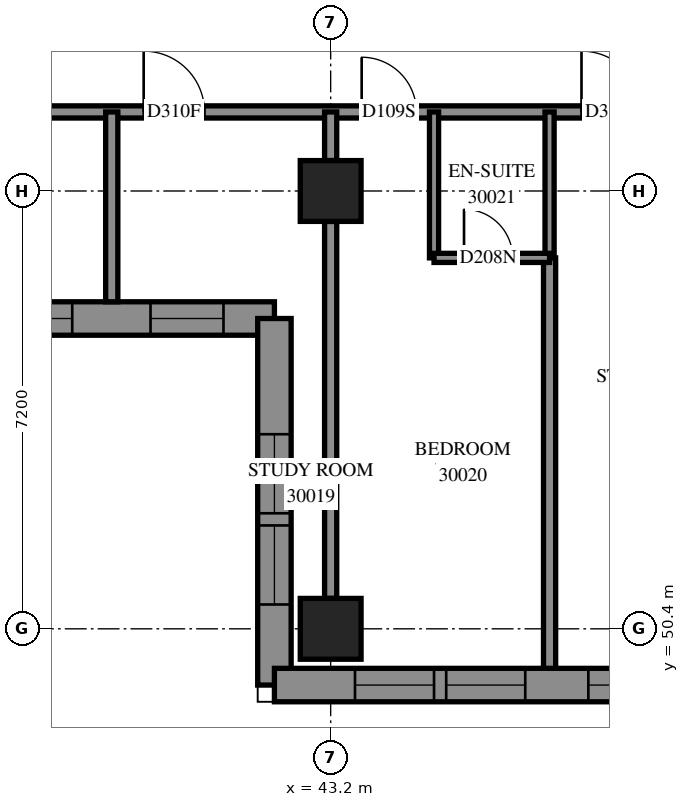
"""IFC4 building model, lengths in metres.
Left out: names, types, materials, properties, quantities, classifications, styles, units other than length and angle.
Written with IfcOpenShell. Run it as: python <this file> out.ifc"""

import sys

from ifc_helpers import new_model, si_unit, direction, frame, frame_2d, origin, origin_2d, place, context, subcontext, project, spatial, polyline, rectangle, outline, extrude, element, fill, save


model = new_model("IFC4")
c1 = context("Model", 3, precision=1e-05, world=origin(), true_north=direction((0.0, 1.0)))
c2 = subcontext(c1, "Body", "Model", "MODEL_VIEW")
j1 = project(units=[si_unit("LENGTHUNIT", "METRE"), si_unit("PLANEANGLEUNIT", "RADIAN")], contexts=[c1])
p1 = place(None, origin())
s1 = spatial("IfcSite", under=j1, at=p1, CompositionType="ELEMENT")
p2 = place(p1, origin())
s2 = spatial("IfcBuilding", under=s1, at=p2, CompositionType="ELEMENT")
p3 = place(p2, frame((0.0, 0.0, 111.8)))
s3 = spatial("IfcBuildingStorey", under=s2, at=p3, CompositionType="ELEMENT", Elevation=111.8)
for number, where, z_axis, x_axis in (
    (1, (43.2, 50.4, 0.0), (0.0, 0.0, 1.0), (1.0, 0.0, 0.0)),
    (2, (43.2, 57.6, 0.0), (0.0, 0.0, 1.0), (1.0, 0.0, 0.0)),
):
    element("IfcColumn", number, at=place(p3, frame(where, z_axis=z_axis, x_axis=x_axis)), inside=s3, PredefinedType="COLUMN", context=c2, shape_type="SweptSolid", body=[
        extrude(rectangle(XDim=1.0, YDim=1.0, at=origin_2d()), origin(), (0.0, 0.0, 1.0), 3.1),
    ])
p4 = place(p3, frame((27.875, 55.503, 0.0), z_axis=(0.0, 0.0, 1.0), x_axis=(1.0, 0.0, 0.0)))
e3 = element("IfcWall", 3, at=p4, inside=s3, PredefinedType="SOLIDWALL", context=c2, shape_type="SweptSolid", body=[
    extrude(outline(polyline([(-0.275, -0.275), (14.125, -0.275), (14.675, 0.275), (0.275, 0.275), (-0.275, -0.275)])), origin(), (0.0, 0.0, 1.0), 3.1),
])
p5 = place(p4, frame((1.175, 0.0, 0.5)))
e4 = element("IfcOpeningElement", 4, at=p5, cuts=e3, PredefinedType="OPENING", context=c2, shape_type="SweptSolid", body=[
    extrude(rectangle(XDim=1.3, YDim=2.45, at=frame_2d((0.65, 1.225))), frame((0.0, 0.285, 0.0), z_axis=(0.0, -1.0, 0.0), x_axis=(1.0, 0.0, 0.0)), (0.0, 0.0, 1.0), 0.57),
])
p6 = place(p4, frame((2.675, 0.0, 0.5)))
e5 = element("IfcOpeningElement", 5, at=p6, cuts=e3, PredefinedType="OPENING", context=c2, shape_type="SweptSolid", body=[
    extrude(rectangle(XDim=1.3, YDim=2.45, at=frame_2d((0.65, 1.225))), frame((0.0, 0.285, 0.0), z_axis=(0.0, -1.0, 0.0), x_axis=(1.0, 0.0, 0.0)), (0.0, 0.0, 1.0), 0.57),
])
p7 = place(p4, frame((4.925, 0.0, 0.5)))
e6 = element("IfcOpeningElement", 6, at=p7, cuts=e3, PredefinedType="OPENING", context=c2, shape_type="SweptSolid", body=[
    extrude(rectangle(XDim=1.3, YDim=2.45, at=frame_2d((0.65, 1.225))), frame((0.0, 0.285, 0.0), z_axis=(0.0, -1.0, 0.0), x_axis=(1.0, 0.0, 0.0)), (0.0, 0.0, 1.0), 0.57),
])
p8 = place(p4, frame((6.425, 0.0, 0.5)))
e7 = element("IfcOpeningElement", 7, at=p8, cuts=e3, PredefinedType="OPENING", context=c2, shape_type="SweptSolid", body=[
    extrude(rectangle(XDim=1.3, YDim=2.45, at=frame_2d((0.65, 1.225))), frame((0.0, 0.285, 0.0), z_axis=(0.0, -1.0, 0.0), x_axis=(1.0, 0.0, 0.0)), (0.0, 0.0, 1.0), 0.57),
])
p9 = place(p4, frame((8.275, 0.0, 0.5)))
e8 = element("IfcOpeningElement", 8, at=p9, cuts=e3, PredefinedType="OPENING", context=c2, shape_type="SweptSolid", body=[
    extrude(rectangle(XDim=1.3, YDim=2.45, at=frame_2d((0.65, 1.225))), frame((0.0, 0.285, 0.0), z_axis=(0.0, -1.0, 0.0), x_axis=(1.0, 0.0, 0.0)), (0.0, 0.0, 1.0), 0.57),
])
p10 = place(p4, frame((9.775, 0.0, 0.5)))
e9 = element("IfcOpeningElement", 9, at=p10, cuts=e3, PredefinedType="OPENING", context=c2, shape_type="SweptSolid", body=[
    extrude(rectangle(XDim=1.3, YDim=2.45, at=frame_2d((0.65, 1.225))), frame((0.0, 0.285, 0.0), z_axis=(0.0, -1.0, 0.0), x_axis=(1.0, 0.0, 0.0)), (0.0, 0.0, 1.0), 0.57),
])
p11 = place(p4, frame((12.363, 0.0, 0.5)))
e10 = element("IfcOpeningElement", 10, at=p11, cuts=e3, PredefinedType="OPENING", context=c2, shape_type="SweptSolid", body=[
    extrude(rectangle(XDim=1.2, YDim=2.45, at=frame_2d((0.6, 1.225))), frame((0.0, 0.285, 0.0), z_axis=(0.0, -1.0, 0.0), x_axis=(1.0, 0.0, 0.0)), (0.0, 0.0, 1.0), 0.57),
])
p12 = place(p3, frame((42.275, 55.503, 0.0), z_axis=(0.0, 0.0, 1.0), x_axis=(0.0, -1.0, 0.0)))
e11 = element("IfcWall", 11, at=p12, inside=s3, PredefinedType="SOLIDWALL", context=c2, shape_type="SweptSolid", body=[
    extrude(outline(polyline([(0.275, -0.275), (6.303, -0.275), (5.753, 0.275), (-0.275, 0.275), (0.275, -0.275)])), origin(), (0.0, 0.0, 1.0), 3.1),
])
p13 = place(p12, frame((1.903, 0.0, 0.5)))
e12 = element("IfcOpeningElement", 12, at=p13, cuts=e11, PredefinedType="OPENING", context=c2, shape_type="SweptSolid", body=[
    extrude(rectangle(XDim=1.3, YDim=2.45, at=frame_2d((0.65, 1.225))), frame((0.0, 0.285, 0.0), z_axis=(0.0, -1.0, 0.0), x_axis=(1.0, 0.0, 0.0)), (0.0, 0.0, 1.0), 0.57),
])
p14 = place(p12, frame((3.403, 0.0, 0.5)))
e13 = element("IfcOpeningElement", 13, at=p14, cuts=e11, PredefinedType="OPENING", context=c2, shape_type="SweptSolid", body=[
    extrude(rectangle(XDim=1.3, YDim=2.45, at=frame_2d((0.65, 1.225))), frame((0.0, 0.285, 0.0), z_axis=(0.0, -1.0, 0.0), x_axis=(1.0, 0.0, 0.0)), (0.0, 0.0, 1.0), 0.57),
])
p15 = place(p3, frame((42.275, 49.475, 0.0), z_axis=(0.0, 0.0, 1.0), x_axis=(1.0, 0.0, 0.0)))
e14 = element("IfcWall", 14, at=p15, inside=s3, PredefinedType="SOLIDWALL", context=c2, shape_type="SweptSolid", body=[
    extrude(outline(polyline([(-0.275, -0.275), (6.925, -0.275), (7.475, 0.275), (0.275, 0.275), (-0.275, -0.275)])), origin(), (0.0, 0.0, 1.0), 3.1),
])
p16 = place(p15, frame((1.325, 0.0, 0.5)))
e15 = element("IfcOpeningElement", 15, at=p16, cuts=e14, PredefinedType="OPENING", context=c2, shape_type="SweptSolid", body=[
    extrude(rectangle(XDim=1.3, YDim=2.45, at=frame_2d((0.65, 1.225))), frame((0.0, 0.285, 0.0), z_axis=(0.0, -1.0, 0.0), x_axis=(1.0, 0.0, 0.0)), (0.0, 0.0, 1.0), 0.57),
])
p17 = place(p15, frame((2.825, 0.0, 0.5)))
e16 = element("IfcOpeningElement", 16, at=p17, cuts=e14, PredefinedType="OPENING", context=c2, shape_type="SweptSolid", body=[
    extrude(rectangle(XDim=1.3, YDim=2.45, at=frame_2d((0.65, 1.225))), frame((0.0, 0.285, 0.0), z_axis=(0.0, -1.0, 0.0), x_axis=(1.0, 0.0, 0.0)), (0.0, 0.0, 1.0), 0.57),
])
p18 = place(p15, frame((5.162, 0.0, 0.5)))
e17 = element("IfcOpeningElement", 17, at=p18, cuts=e14, PredefinedType="OPENING", context=c2, shape_type="SweptSolid", body=[
    extrude(rectangle(XDim=1.2, YDim=2.45, at=frame_2d((0.6, 1.225))), frame((0.0, 0.285, 0.0), z_axis=(0.0, -1.0, 0.0), x_axis=(1.0, 0.0, 0.0)), (0.0, 0.0, 1.0), 0.57),
])
p19 = place(p3, frame((28.802, 58.9, 0.0), z_axis=(0.0, 0.0, 1.0), x_axis=(1.0, 0.0, 0.0)))
e18 = element("IfcWall", 18, at=p19, inside=s3, PredefinedType="PARTITIONING", context=c2, shape_type="SweptSolid", body=[
    extrude(rectangle(XDim=24.098, YDim=0.2, at=frame_2d((12.049, 0.0))), origin(), (0.0, 0.0, 1.0), 3.1),
])
p20 = place(p19, frame((11.323, 0.0, 0.0)))
e19 = element("IfcOpeningElement", 19, at=p20, cuts=e18, PredefinedType="OPENING", context=c2, shape_type="SweptSolid", body=[
    extrude(rectangle(XDim=1.0, YDim=2.1, at=frame_2d((0.5, 1.05))), frame((0.0, 0.11, 0.0), z_axis=(0.0, -1.0, 0.0), x_axis=(1.0, 0.0, 0.0)), (0.0, 0.0, 1.0), 0.22),
])
p21 = place(p19, frame((14.908, 0.0, 0.0)))
e20 = element("IfcOpeningElement", 20, at=p21, cuts=e18, PredefinedType="OPENING", context=c2, shape_type="SweptSolid", body=[
    extrude(rectangle(XDim=0.9, YDim=2.1, at=frame_2d((0.45, 1.05))), frame((0.0, 0.11, 0.0), z_axis=(0.0, -1.0, 0.0), x_axis=(1.0, 0.0, 0.0)), (0.0, 0.0, 1.0), 0.22),
])
p22 = place(p19, frame((18.523, 0.0, 0.0)))
e21 = element("IfcOpeningElement", 21, at=p22, cuts=e18, PredefinedType="OPENING", context=c2, shape_type="SweptSolid", body=[
    extrude(rectangle(XDim=1.0, YDim=2.1, at=frame_2d((0.5, 1.05))), frame((0.0, 0.11, 0.0), z_axis=(0.0, -1.0, 0.0), x_axis=(1.0, 0.0, 0.0)), (0.0, 0.0, 1.0), 0.22),
])
p23 = place(p19, frame((22.845, 0.0, 0.0)))
e22 = element("IfcOpeningElement", 22, at=p23, cuts=e18, PredefinedType="OPENING", context=c2, shape_type="SweptSolid", body=[
    extrude(rectangle(XDim=1.0, YDim=2.1, at=frame_2d((0.5, 1.05))), frame((0.0, 0.11, 0.0), z_axis=(0.0, -1.0, 0.0), x_axis=(1.0, 0.0, 0.0)), (0.0, 0.0, 1.0), 0.22),
])
p24 = place(p3, frame((46.8, 49.75, 0.0), z_axis=(0.0, 0.0, 1.0), x_axis=(0.0, 1.0, 0.0)))
e23 = element("IfcWall", 23, at=p24, inside=s3, PredefinedType="PARTITIONING", context=c2, shape_type="SweptSolid", body=[
    extrude(rectangle(XDim=6.75, YDim=0.2, at=frame_2d((3.375, 0.0))), origin(), (0.0, 0.0, 1.0), 3.1),
])
p25 = place(p3, frame((43.2, 50.9, 0.0), z_axis=(0.0, 0.0, 1.0), x_axis=(0.0, 1.0, 0.0)))
e24 = element("IfcWall", 24, at=p25, inside=s3, PredefinedType="PARTITIONING", context=c2, shape_type="SweptSolid", body=[
    extrude(rectangle(XDim=6.2, YDim=0.2, at=frame_2d((3.1, 0.0))), origin(), (0.0, 0.0, 1.0), 2.6),
])
p26 = place(p3, frame((39.6, 55.778, 0.0), z_axis=(0.0, 0.0, 1.0), x_axis=(0.0, 1.0, 0.0)))
e25 = element("IfcWall", 25, at=p26, inside=s3, PredefinedType="PARTITIONING", context=c2, shape_type="SweptSolid", body=[
    extrude(rectangle(XDim=3.122, YDim=0.2, at=frame_2d((1.561, 0.0))), origin(), (0.0, 0.0, 1.0), 3.1),
])
for number, where, z_axis, x_axis in (
    (26, (44.9, 56.5, 0.0), (0.0, 0.0, 1.0), (0.0, 1.0, 0.0)),
    (27, (46.8, 56.5, 0.0), (0.0, 0.0, 1.0), (0.0, 1.0, 0.0)),
):
    element("IfcWall", number, at=place(p3, frame(where, z_axis=z_axis, x_axis=x_axis)), inside=s3, PredefinedType="PARTITIONING", context=c2, shape_type="SweptSolid", body=[
        extrude(rectangle(XDim=2.4, YDim=0.15, at=frame_2d((1.2, 0.0))), origin(), (0.0, 0.0, 1.0), 3.1),
    ])
p27 = place(p3, frame((44.9, 56.5, 0.0), z_axis=(0.0, 0.0, 1.0), x_axis=(1.0, 0.0, 0.0)))
e28 = element("IfcWall", 28, at=p27, inside=s3, PredefinedType="PARTITIONING", context=c2, shape_type="SweptSolid", body=[
    extrude(rectangle(XDim=1.9, YDim=0.15, at=frame_2d((0.95, 0.0))), origin(), (0.0, 0.0, 1.0), 3.1),
])
p28 = place(p27, frame((0.493, 0.0, 0.0)))
e29 = element("IfcOpeningElement", 29, at=p28, cuts=e28, PredefinedType="OPENING", context=c2, shape_type="SweptSolid", body=[
    extrude(rectangle(XDim=0.8, YDim=2.1, at=frame_2d((0.4, 1.05))), frame((0.0, 0.085, 0.0), z_axis=(0.0, -1.0, 0.0), x_axis=(1.0, 0.0, 0.0)), (0.0, 0.0, 1.0), 0.17),
])
p29 = place(p3, frame((43.2, 58.1, 0.0), z_axis=(0.0, 0.0, 1.0), x_axis=(0.0, 1.0, 0.0)))
e30 = element("IfcWall", 30, at=p29, inside=s3, PredefinedType="PARTITIONING", context=c2, shape_type="SweptSolid", body=[
    extrude(rectangle(XDim=0.8, YDim=0.2, at=frame_2d((0.4, 0.0))), origin(), (0.0, 0.0, 1.0), 3.1),
])
p30 = place(p10, origin())
e31 = element("IfcWindow", 31, at=p30, inside=s3, PartitioningType="SINGLE_PANEL", PredefinedType="WINDOW", context=c2, shape_type="SweptSolid", body=[
    extrude(rectangle(XDim=1.3, YDim=2.45, at=frame_2d((0.65, 1.225))), frame((0.0, 0.155, 0.0), z_axis=(0.0, -1.0, 0.0), x_axis=(1.0, 0.0, 0.0)), (0.0, 0.0, 1.0), 0.06),
])
fill(e9, e31)
p31 = place(p11, origin())
e32 = element("IfcWindow", 32, at=p31, inside=s3, PartitioningType="SINGLE_PANEL", PredefinedType="WINDOW", context=c2, shape_type="SweptSolid", body=[
    extrude(rectangle(XDim=1.2, YDim=2.45, at=frame_2d((0.6, 1.225))), frame((0.0, 0.155, 0.0), z_axis=(0.0, -1.0, 0.0), x_axis=(1.0, 0.0, 0.0)), (0.0, 0.0, 1.0), 0.06),
])
fill(e10, e32)
p32 = place(p13, origin())
e33 = element("IfcWindow", 33, at=p32, inside=s3, PartitioningType="SINGLE_PANEL", PredefinedType="WINDOW", context=c2, shape_type="SweptSolid", body=[
    extrude(rectangle(XDim=1.3, YDim=2.45, at=frame_2d((0.65, 1.225))), frame((0.0, 0.155, 0.0), z_axis=(0.0, -1.0, 0.0), x_axis=(1.0, 0.0, 0.0)), (0.0, 0.0, 1.0), 0.06),
])
fill(e12, e33)
p33 = place(p14, origin())
e34 = element("IfcWindow", 34, at=p33, inside=s3, PartitioningType="SINGLE_PANEL", PredefinedType="WINDOW", context=c2, shape_type="SweptSolid", body=[
    extrude(rectangle(XDim=1.3, YDim=2.45, at=frame_2d((0.65, 1.225))), frame((0.0, 0.155, 0.0), z_axis=(0.0, -1.0, 0.0), x_axis=(1.0, 0.0, 0.0)), (0.0, 0.0, 1.0), 0.06),
])
fill(e13, e34)
p34 = place(p16, origin())
e35 = element("IfcWindow", 35, at=p34, inside=s3, PartitioningType="SINGLE_PANEL", PredefinedType="WINDOW", context=c2, shape_type="SweptSolid", body=[
    extrude(rectangle(XDim=1.3, YDim=2.45, at=frame_2d((0.65, 1.225))), frame((0.0, 0.155, 0.0), z_axis=(0.0, -1.0, 0.0), x_axis=(1.0, 0.0, 0.0)), (0.0, 0.0, 1.0), 0.06),
])
fill(e15, e35)
p35 = place(p17, origin())
e36 = element("IfcWindow", 36, at=p35, inside=s3, PartitioningType="SINGLE_PANEL", PredefinedType="WINDOW", context=c2, shape_type="SweptSolid", body=[
    extrude(rectangle(XDim=1.3, YDim=2.45, at=frame_2d((0.65, 1.225))), frame((0.0, 0.155, 0.0), z_axis=(0.0, -1.0, 0.0), x_axis=(1.0, 0.0, 0.0)), (0.0, 0.0, 1.0), 0.06),
])
fill(e16, e36)
p36 = place(p18, origin())
e37 = element("IfcWindow", 37, at=p36, inside=s3, PartitioningType="SINGLE_PANEL", PredefinedType="WINDOW", context=c2, shape_type="SweptSolid", body=[
    extrude(rectangle(XDim=1.2, YDim=2.45, at=frame_2d((0.6, 1.225))), frame((0.0, 0.155, 0.0), z_axis=(0.0, -1.0, 0.0), x_axis=(1.0, 0.0, 0.0)), (0.0, 0.0, 1.0), 0.06),
])
fill(e17, e37)
p37 = place(p20, origin())
e38 = element("IfcDoor", 38, at=p37, inside=s3, OperationType="SINGLE_SWING_RIGHT", PredefinedType="DOOR", context=c2, shape_type="SweptSolid", body=[
    extrude(rectangle(XDim=1.0, YDim=2.1, at=frame_2d((0.5, 1.05))), frame((0.0, 0.025, 0.0), z_axis=(0.0, -1.0, 0.0), x_axis=(1.0, 0.0, 0.0)), (0.0, 0.0, 1.0), 0.05),
])
fill(e19, e38)
p38 = place(p21, origin())
e39 = element("IfcDoor", 39, at=p38, inside=s3, OperationType="SINGLE_SWING_LEFT", PredefinedType="DOOR", context=c2, shape_type="SweptSolid", body=[
    extrude(rectangle(XDim=0.9, YDim=2.1, at=frame_2d((0.45, 1.05))), frame((0.0, 0.025, 0.0), z_axis=(0.0, -1.0, 0.0), x_axis=(1.0, 0.0, 0.0)), (0.0, 0.0, 1.0), 0.05),
])
fill(e20, e39)
p39 = place(p28, origin())
e40 = element("IfcDoor", 40, at=p39, inside=s3, OperationType="SINGLE_SWING_RIGHT", PredefinedType="DOOR", context=c2, shape_type="SweptSolid", body=[
    extrude(rectangle(XDim=0.8, YDim=2.1, at=frame_2d((0.4, 1.05))), frame((0.0, 0.025, 0.0), z_axis=(0.0, -1.0, 0.0), x_axis=(1.0, 0.0, 0.0)), (0.0, 0.0, 1.0), 0.05),
])
fill(e29, e40)
p40 = place(p22, origin())
e41 = element("IfcDoor", 41, at=p40, inside=s3, OperationType="SINGLE_SWING_RIGHT", PredefinedType="DOOR", context=c2, shape_type="SweptSolid", body=[
    extrude(rectangle(XDim=1.0, YDim=2.1, at=frame_2d((0.5, 1.05))), frame((0.0, 0.025, 0.0), z_axis=(0.0, -1.0, 0.0), x_axis=(1.0, 0.0, 0.0)), (0.0, 0.0, 1.0), 0.05),
])
fill(e21, e41)
save(model, sys.argv[1])
